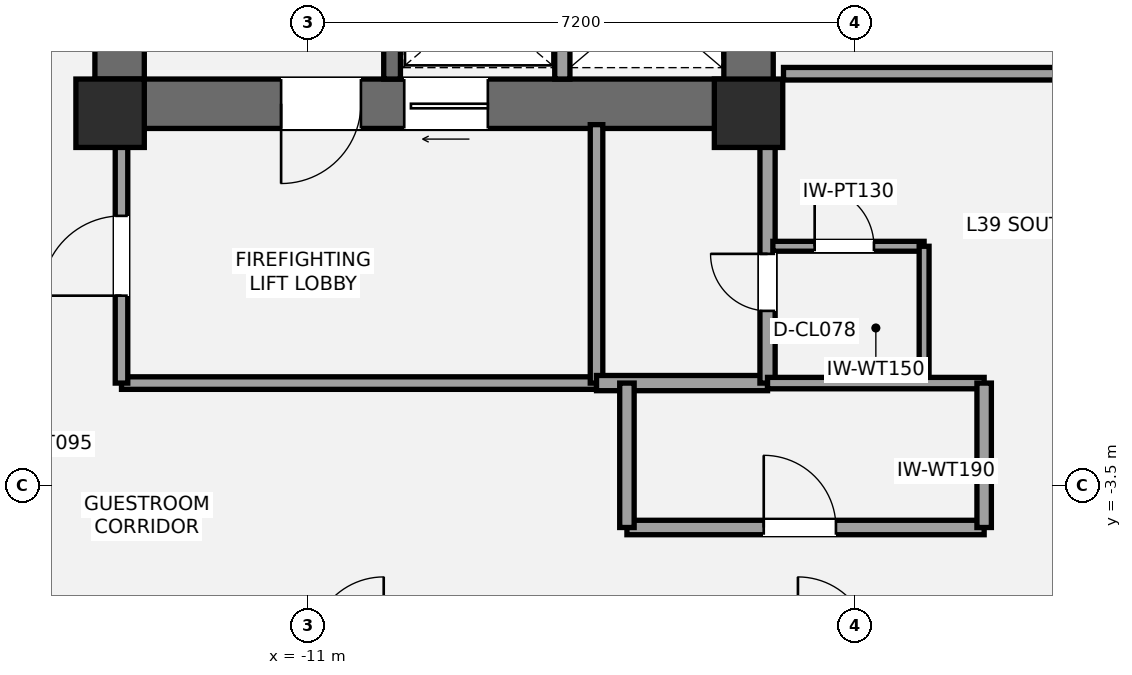
"""IFC4 building model, lengths in metres.
Left out: names, types, materials, properties, quantities, classifications, styles, units other than length and angle.
Written with IfcOpenShell. Run it as: python <this file> out.ifc"""

import sys

from ifc_helpers import new_model, si_unit, direction, frame, frame_2d, origin, origin_2d, place, context, subcontext, project, spatial, rectangle, extrude, element, fill, save


model = new_model("IFC4")
c1 = context("Model", 3, precision=1e-05, world=origin(), true_north=direction((0.0, 1.0)))
c2 = subcontext(c1, "Body", "Model", "MODEL_VIEW")
j1 = project(units=[si_unit("LENGTHUNIT", "METRE"), si_unit("PLANEANGLEUNIT", "RADIAN")], contexts=[c1])
p1 = place(None, origin())
s1 = spatial("IfcSite", under=j1, at=p1, CompositionType="ELEMENT")
p2 = place(p1, origin())
s2 = spatial("IfcBuilding", under=s1, at=p2, CompositionType="ELEMENT")
p3 = place(p2, frame((0.0, 0.0, 147.0)))
s3 = spatial("IfcBuildingStorey", under=s2, at=p3, CompositionType="ELEMENT", Elevation=147.0)
p4 = place(p3, frame((-13.475, 1.2, 0.0), z_axis=(0.0, 0.0, 1.0), x_axis=(0.0, 1.0, 0.0)))
e1 = element("IfcWall", 1, at=p4, inside=s3, PredefinedType="SHEAR", context=c2, shape_type="SweptSolid", body=[
    extrude(rectangle(XDim=8.45, YDim=0.65, at=frame_2d((4.225, 0.0))), origin(), (0.0, 0.0, 1.0), 3.2),
])
p5 = place(p3, frame((-4.875, 1.525, 0.0), z_axis=(0.0, 0.0, 1.0), x_axis=(-1.0, 0.0, 0.0)))
e2 = element("IfcWall", 2, at=p5, inside=s3, PredefinedType="SHEAR", context=c2, shape_type="SweptSolid", body=[
    extrude(rectangle(XDim=8.925, YDim=0.65, at=frame_2d((4.462, 0.0))), origin(), (0.0, 0.0, 1.0), 3.2),
])
p6 = place(p5, frame((5.425, 0.0, 0.0)))
e3 = element("IfcOpeningElement", 3, at=p6, cuts=e2, PredefinedType="OPENING", context=c2, shape_type="SweptSolid", body=[
    extrude(rectangle(XDim=1.05, YDim=2.15, at=frame_2d((0.525, 1.075))), frame((0.0, 0.335, 0.0), z_axis=(0.0, -1.0, 0.0), x_axis=(1.0, 0.0, 0.0)), (0.0, 0.0, 1.0), 0.67),
])
p7 = place(p5, frame((3.755, 0.0, 0.0)))
e4 = element("IfcOpeningElement", 4, at=p7, cuts=e2, PredefinedType="OPENING", context=c2, shape_type="SweptSolid", body=[
    extrude(rectangle(XDim=1.1, YDim=2.2, at=frame_2d((0.55, 1.1))), frame((0.0, 0.335, 0.0), z_axis=(0.0, -1.0, 0.0), x_axis=(1.0, 0.0, 0.0)), (0.0, 0.0, 1.0), 0.67),
])
p8 = place(p3, frame((-5.2, 1.2, 0.0), z_axis=(0.0, 0.0, 1.0), x_axis=(0.0, 1.0, 0.0)))
e5 = element("IfcWall", 5, at=p8, inside=s3, PredefinedType="SHEAR", context=c2, shape_type="SweptSolid", body=[
    extrude(rectangle(XDim=2.6, YDim=0.65, at=frame_2d((1.3, 0.0))), origin(), (0.0, 0.0, 1.0), 3.2),
])
p9 = place(p3, frame((-9.89, 1.85, 0.0), z_axis=(0.0, 0.0, 1.0), x_axis=(0.0, 1.0, 0.0)))
e6 = element("IfcWall", 6, at=p9, inside=s3, PredefinedType="SHEAR", context=c2, shape_type="SweptSolid", body=[
    extrude(rectangle(XDim=7.15, YDim=0.22, at=frame_2d((3.575, 0.0))), origin(), (0.0, 0.0, 1.0), 3.2),
])
for number, where, z_axis, x_axis in (
    (7, (-13.6, 1.4, 0.0), (0.0, 0.0, 1.0), (1.0, 0.0, 0.0)),
    (8, (-5.2, 1.4, 0.0), (0.0, 0.0, 1.0), (1.0, 0.0, 0.0)),
):
    element("IfcColumn", number, at=place(p3, frame(where, z_axis=z_axis, x_axis=x_axis)), inside=s3, PredefinedType="COLUMN", context=c2, shape_type="SweptSolid", body=[
        extrude(rectangle(XDim=0.9, YDim=0.9, at=origin_2d()), origin(), (0.0, 0.0, 1.0), 3.2),
    ])
p10 = place(p3, frame((-13.45, -2.15, 0.0), z_axis=(0.0, 0.0, 1.0), x_axis=(1.0, 0.0, 0.0)))
e9 = element("IfcWall", 9, at=p10, inside=s3, PredefinedType="PARTITIONING", context=c2, shape_type="SweptSolid", body=[
    extrude(rectangle(XDim=6.25, YDim=0.165, at=frame_2d((3.125, 0.0))), origin(), (0.0, 0.0, 1.0), 2.473),
])
p11 = place(p3, frame((-13.45, -2.15, 0.0), z_axis=(0.0, 0.0, 1.0), x_axis=(0.0, 1.0, 0.0)))
e10 = element("IfcWall", 10, at=p11, inside=s3, PredefinedType="PARTITIONING", context=c2, shape_type="SweptSolid", body=[
    extrude(rectangle(XDim=3.4, YDim=0.165, at=frame_2d((1.7, 0.0))), origin(), (0.0, 0.0, 1.0), 2.473),
])
p12 = place(p11, frame((1.15, 0.0, 0.0)))
e11 = element("IfcOpeningElement", 11, at=p12, cuts=e10, PredefinedType="OPENING", context=c2, shape_type="SweptSolid", body=[
    extrude(rectangle(XDim=1.05, YDim=2.15, at=frame_2d((0.525, 1.075))), frame((0.0, 0.093, 0.0), z_axis=(0.0, -1.0, 0.0), x_axis=(1.0, 0.0, 0.0)), (0.0, 0.0, 1.0), 0.185),
])
p13 = place(p3, frame((-7.2, -2.15, 0.0), z_axis=(0.0, 0.0, 1.0), x_axis=(0.0, 1.0, 0.0)))
e12 = element("IfcWall", 12, at=p13, inside=s3, PredefinedType="PARTITIONING", context=c2, shape_type="SweptSolid", body=[
    extrude(rectangle(XDim=3.4, YDim=0.165, at=frame_2d((1.7, 0.0))), origin(), (0.0, 0.0, 1.0), 2.473),
])
p14 = place(p3, frame((-7.2, -2.15, 0.0), z_axis=(0.0, 0.0, 1.0), x_axis=(1.0, 0.0, 0.0)))
e13 = element("IfcWall", 13, at=p14, inside=s3, PredefinedType="SOLIDWALL", context=c2, shape_type="SweptSolid", body=[
    extrude(rectangle(XDim=2.25, YDim=0.2, at=frame_2d((1.125, 0.0))), origin(), (0.0, 0.0, 1.0), 3.02),
])
p15 = place(p3, frame((-4.95, -2.15, 0.0), z_axis=(0.0, 0.0, 1.0), x_axis=(0.0, 1.0, 0.0)))
e14 = element("IfcWall", 14, at=p15, inside=s3, PredefinedType="SOLIDWALL", context=c2, shape_type="SweptSolid", body=[
    extrude(rectangle(XDim=3.4, YDim=0.2, at=frame_2d((1.7, 0.0))), origin(), (0.0, 0.0, 1.0), 2.473),
])
p16 = place(p15, frame((0.95, 0.0, 0.0)))
e15 = element("IfcOpeningElement", 15, at=p16, cuts=e14, PredefinedType="OPENING", context=c2, shape_type="SweptSolid", body=[
    extrude(rectangle(XDim=0.75, YDim=2.1, at=frame_2d((0.375, 1.05))), frame((0.0, 0.11, 0.0), z_axis=(0.0, -1.0, 0.0), x_axis=(1.0, 0.0, 0.0)), (0.0, 0.0, 1.0), 0.22),
])
p17 = place(p3, frame((-4.88, -0.35, 0.0), z_axis=(0.0, 0.0, 1.0), x_axis=(1.0, 0.0, 0.0)))
e16 = element("IfcWall", 16, at=p17, inside=s3, PredefinedType="PARTITIONING", context=c2, shape_type="SweptSolid", body=[
    extrude(rectangle(XDim=1.99, YDim=0.13, at=frame_2d((0.995, 0.0))), origin(), (0.0, 0.0, 1.0), 3.02),
])
p18 = place(p17, frame((0.55, 0.0, 0.0)))
e17 = element("IfcOpeningElement", 17, at=p18, cuts=e16, PredefinedType="OPENING", context=c2, shape_type="SweptSolid", body=[
    extrude(rectangle(XDim=0.78, YDim=2.1, at=frame_2d((0.39, 1.05))), frame((0.0, 0.075, 0.0), z_axis=(0.0, -1.0, 0.0), x_axis=(1.0, 0.0, 0.0)), (0.0, 0.0, 1.0), 0.15),
])
p19 = place(p3, frame((-2.89, -2.15, 0.0), z_axis=(0.0, 0.0, 1.0), x_axis=(0.0, 1.0, 0.0)))
e18 = element("IfcWall", 18, at=p19, inside=s3, PredefinedType="PARTITIONING", context=c2, shape_type="SweptSolid", body=[
    extrude(rectangle(XDim=1.8, YDim=0.13, at=frame_2d((0.9, 0.0))), origin(), (0.0, 0.0, 1.0), 3.02),
])
p20 = place(p3, frame((-7.65, 1.85, 0.0), z_axis=(0.0, 0.0, 1.0), x_axis=(0.0, 1.0, 0.0)))
e19 = element("IfcWall", 19, at=p20, inside=s3, PredefinedType="SOLIDWALL", context=c2, shape_type="SweptSolid", body=[
    extrude(rectangle(XDim=1.93, YDim=0.2, at=frame_2d((0.965, 0.0))), origin(), (0.0, 0.0, 1.0), 3.02),
])
p21 = place(p3, frame((-4.74, 1.92, 0.0), z_axis=(0.0, 0.0, 1.0), x_axis=(1.0, 0.0, 0.0)))
e20 = element("IfcWall", 20, at=p21, inside=s3, PredefinedType="PARTITIONING", context=c2, shape_type="SweptSolid", body=[
    extrude(rectangle(XDim=3.89, YDim=0.165, at=frame_2d((1.945, 0.0))), origin(), (0.0, 0.0, 1.0), 2.16),
])
p22 = place(p3, frame((-6.8, -4.05, 0.0), z_axis=(0.0, 0.0, 1.0), x_axis=(1.0, 0.0, 0.0)))
e21 = element("IfcWall", 21, at=p22, inside=s3, PredefinedType="PLUMBINGWALL", context=c2, shape_type="SweptSolid", body=[
    extrude(rectangle(XDim=4.7, YDim=0.19, at=frame_2d((2.35, 0.0))), origin(), (0.0, 0.0, 1.0), 2.555),
])
p23 = place(p22, frame((1.8, 0.0, 0.0)))
e22 = element("IfcOpeningElement", 22, at=p23, cuts=e21, PredefinedType="OPENING", context=c2, shape_type="SweptSolid", body=[
    extrude(rectangle(XDim=0.95, YDim=2.15, at=frame_2d((0.475, 1.075))), frame((0.0, 0.105, 0.0), z_axis=(0.0, -1.0, 0.0), x_axis=(1.0, 0.0, 0.0)), (0.0, 0.0, 1.0), 0.21),
])
p24 = place(p3, frame((-4.95, -2.15, 0.0), z_axis=(0.0, 0.0, 1.0), x_axis=(1.0, 0.0, 0.0)))
e23 = element("IfcWall", 23, at=p24, inside=s3, PredefinedType="PLUMBINGWALL", context=c2, shape_type="SweptSolid", body=[
    extrude(rectangle(XDim=2.85, YDim=0.15, at=frame_2d((1.425, 0.0))), origin(), (0.0, 0.0, 1.0), 3.02),
])
p25 = place(p3, frame((-6.8, -4.05, 0.0), z_axis=(0.0, 0.0, 1.0), x_axis=(0.0, 1.0, 0.0)))
e24 = element("IfcWall", 24, at=p25, inside=s3, PredefinedType="PLUMBINGWALL", context=c2, shape_type="SweptSolid", body=[
    extrude(rectangle(XDim=1.9, YDim=0.19, at=frame_2d((0.95, 0.0))), origin(), (0.0, 0.0, 1.0), 2.473),
])
p26 = place(p3, frame((-2.1, -4.05, 0.0), z_axis=(0.0, 0.0, 1.0), x_axis=(0.0, 1.0, 0.0)))
e25 = element("IfcWall", 25, at=p26, inside=s3, PredefinedType="PLUMBINGWALL", context=c2, shape_type="SweptSolid", body=[
    extrude(rectangle(XDim=1.9, YDim=0.19, at=frame_2d((0.95, 0.0))), origin(), (0.0, 0.0, 1.0), 3.02),
])
p27 = place(p6, origin())
e26 = element("IfcDoor", 26, at=p27, inside=s3, OperationType="SINGLE_SWING_RIGHT", PredefinedType="DOOR", context=c2, shape_type="SweptSolid", body=[
    extrude(rectangle(XDim=1.05, YDim=2.15, at=frame_2d((0.525, 1.075))), frame((0.0, 0.025, 0.0), z_axis=(0.0, -1.0, 0.0), x_axis=(1.0, 0.0, 0.0)), (0.0, 0.0, 1.0), 0.05),
])
fill(e3, e26)
p28 = place(p12, origin())
e27 = element("IfcDoor", 27, at=p28, inside=s3, OperationType="SINGLE_SWING_LEFT", PredefinedType="DOOR", context=c2, shape_type="SweptSolid", body=[
    extrude(rectangle(XDim=1.05, YDim=2.15, at=frame_2d((0.525, 1.075))), frame((0.0, 0.025, 0.0), z_axis=(0.0, -1.0, 0.0), x_axis=(1.0, 0.0, 0.0)), (0.0, 0.0, 1.0), 0.05),
])
fill(e11, e27)
p29 = place(p16, origin())
e28 = element("IfcDoor", 28, at=p29, inside=s3, OperationType="SINGLE_SWING_RIGHT", PredefinedType="DOOR", context=c2, shape_type="SweptSolid", body=[
    extrude(rectangle(XDim=0.75, YDim=2.1, at=frame_2d((0.375, 1.05))), frame((0.0, 0.025, 0.0), z_axis=(0.0, -1.0, 0.0), x_axis=(1.0, 0.0, 0.0)), (0.0, 0.0, 1.0), 0.05),
])
fill(e15, e28)
p30 = place(p18, origin())
e29 = element("IfcDoor", 29, at=p30, inside=s3, OperationType="SINGLE_SWING_LEFT", PredefinedType="DOOR", context=c2, shape_type="SweptSolid", body=[
    extrude(rectangle(XDim=0.78, YDim=2.1, at=frame_2d((0.39, 1.05))), frame((0.0, 0.025, 0.0), z_axis=(0.0, -1.0, 0.0), x_axis=(1.0, 0.0, 0.0)), (0.0, 0.0, 1.0), 0.05),
])
fill(e17, e29)
p31 = place(p7, origin())
e30 = element("IfcDoor", 30, at=p31, inside=s3, OperationType="SLIDING_TO_LEFT", PredefinedType="DOOR", context=c2, shape_type="SweptSolid", body=[
    extrude(rectangle(XDim=1.1, YDim=2.2, at=frame_2d((0.55, 1.1))), frame((0.0, 0.025, 0.0), z_axis=(0.0, -1.0, 0.0), x_axis=(1.0, 0.0, 0.0)), (0.0, 0.0, 1.0), 0.05),
])
fill(e4, e30)
p32 = place(p23, origin())
e31 = element("IfcDoor", 31, at=p32, inside=s3, OperationType="SINGLE_SWING_LEFT", PredefinedType="DOOR", context=c2, shape_type="SweptSolid", body=[
    extrude(rectangle(XDim=0.95, YDim=2.15, at=frame_2d((0.475, 1.075))), frame((0.0, 0.025, 0.0), z_axis=(0.0, -1.0, 0.0), x_axis=(1.0, 0.0, 0.0)), (0.0, 0.0, 1.0), 0.05),
])
fill(e22, e31)
save(model, sys.argv[1])
